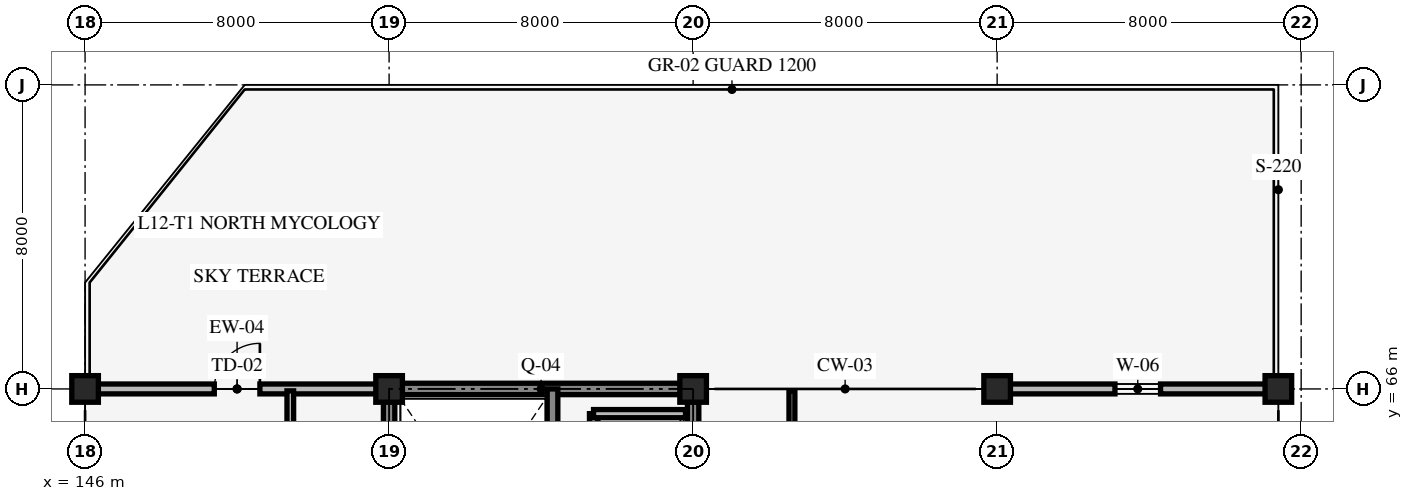
"""IFC4 building model, lengths in metres.
Left out: names, types, materials, properties, quantities, classifications, styles, units other than length and angle.
Written with IfcOpenShell. Run it as: python <this file> out.ifc"""

import sys

from ifc_helpers import new_model, si_unit, direction, frame, frame_2d, origin, origin_2d, place, context, subcontext, project, spatial, rectangle, extrude, element, fill, save


model = new_model("IFC4")
c1 = context("Model", 3, precision=1e-05, world=origin(), true_north=direction((0.0, 1.0)))
c2 = subcontext(c1, "Body", "Model", "MODEL_VIEW")
j1 = project(units=[si_unit("LENGTHUNIT", "METRE"), si_unit("PLANEANGLEUNIT", "RADIAN")], contexts=[c1])
p1 = place(None, origin())
s1 = spatial("IfcSite", under=j1, at=p1, CompositionType="ELEMENT")
p2 = place(p1, origin())
s2 = spatial("IfcBuilding", under=s1, at=p2, CompositionType="ELEMENT")
p3 = place(p2, frame((0.0, 0.0, 48.6)))
s3 = spatial("IfcBuildingStorey", under=s2, at=p3, CompositionType="ELEMENT", Elevation=48.6)
p4 = place(p3, frame((162.0, 58.0, 0.0), z_axis=(0.0, 0.0, 1.0), x_axis=(0.0, 1.0, 0.0)))
e1 = element("IfcWall", 1, at=p4, inside=s3, PredefinedType="SHEAR", context=c2, shape_type="SweptSolid", body=[
    extrude(rectangle(XDim=8.0, YDim=0.3, at=frame_2d((4.0, 0.0))), origin(), (0.0, 0.0, 1.0), 3.95),
])
p5 = place(p4, frame((3.275, 0.0, 0.0)))
e2 = element("IfcOpeningElement", 2, at=p5, cuts=e1, PredefinedType="OPENING", context=c2, shape_type="SweptSolid", body=[
    extrude(rectangle(XDim=1.05, YDim=2.2, at=frame_2d((0.525, 1.1))), frame((0.0, 0.16, 0.0), z_axis=(0.0, -1.0, 0.0), x_axis=(1.0, 0.0, 0.0)), (0.0, 0.0, 1.0), 0.32),
])
p6 = place(p4, frame((5.45, 0.0, 0.0)))
e3 = element("IfcOpeningElement", 3, at=p6, cuts=e1, PredefinedType="OPENING", context=c2, shape_type="SweptSolid", body=[
    extrude(rectangle(XDim=1.4, YDim=2.3, at=frame_2d((0.7, 1.15))), frame((0.0, 0.16, 0.0), z_axis=(0.0, -1.0, 0.0), x_axis=(1.0, 0.0, 0.0)), (0.0, 0.0, 1.0), 0.32),
])
for number, where, z_axis, x_axis in (
    (4, (162.0, 66.0, 0.0), (0.0, 0.0, 1.0), (-1.0, 0.0, 0.0)),
    (5, (154.0, 66.0, 0.0), (0.0, 0.0, 1.0), (0.0, -1.0, 0.0)),
):
    element("IfcWall", number, at=place(p3, frame(where, z_axis=z_axis, x_axis=x_axis)), inside=s3, PredefinedType="SHEAR", context=c2, shape_type="SweptSolid", body=[
        extrude(rectangle(XDim=8.0, YDim=0.3, at=frame_2d((4.0, 0.0))), origin(), (0.0, 0.0, 1.0), 3.95),
    ])
p7 = place(p3, frame((158.3, 58.0, 0.0), z_axis=(0.0, 0.0, 1.0), x_axis=(0.0, 1.0, 0.0)))
e6 = element("IfcWall", 6, at=p7, inside=s3, PredefinedType="SHEAR", context=c2, shape_type="SweptSolid", body=[
    extrude(rectangle(XDim=8.0, YDim=0.28, at=frame_2d((4.0, 0.0))), origin(), (0.0, 0.0, 1.0), 3.95),
])
for number, where, z_axis, x_axis in (
    (7, (146.0, 66.0, 0.0), (0.0, 0.0, 1.0), (1.0, 0.0, 0.0)),
    (8, (154.0, 66.0, 0.0), (0.0, 0.0, 1.0), (1.0, 0.0, 0.0)),
    (9, (162.0, 66.0, 0.0), (0.0, 0.0, 1.0), (1.0, 0.0, 0.0)),
    (10, (170.0, 66.0, 0.0), (0.0, 0.0, 1.0), (1.0, 0.0, 0.0)),
    (11, (177.4, 66.0, 0.0), (0.0, 0.0, 1.0), (1.0, 0.0, 0.0)),
):
    element("IfcColumn", number, at=place(p3, frame(where, z_axis=z_axis, x_axis=x_axis)), inside=s3, PredefinedType="COLUMN", context=c2, shape_type="SweptSolid", body=[
        extrude(rectangle(XDim=0.7, YDim=0.7, at=origin_2d()), origin(), (0.0, 0.0, 1.0), 4.2),
    ])
p8 = place(p3, frame((146.0, 66.0, 0.0), z_axis=(0.0, 0.0, 1.0), x_axis=(1.0, 0.0, 0.0)))
e12 = element("IfcWall", 12, at=p8, inside=s3, PredefinedType="STANDARD", context=c2, shape_type="SweptSolid", body=[
    extrude(rectangle(XDim=8.0, YDim=0.26, at=frame_2d((4.0, 0.0))), origin(), (0.0, 0.0, 1.0), 3.34),
])
p9 = place(p8, frame((3.4, 0.0, 0.0)))
e13 = element("IfcOpeningElement", 13, at=p9, cuts=e12, PredefinedType="OPENING", context=c2, shape_type="SweptSolid", body=[
    extrude(rectangle(XDim=1.2, YDim=2.2, at=frame_2d((0.6, 1.1))), frame((0.0, 0.14, 0.0), z_axis=(0.0, -1.0, 0.0), x_axis=(1.0, 0.0, 0.0)), (0.0, 0.0, 1.0), 0.28),
])
p10 = place(p3, frame((170.0, 66.0, 0.0), z_axis=(0.0, 0.0, 1.0), x_axis=(1.0, 0.0, 0.0)))
e14 = element("IfcWall", 14, at=p10, inside=s3, PredefinedType="STANDARD", context=c2, shape_type="SweptSolid", body=[
    extrude(rectangle(XDim=7.4, YDim=0.26, at=frame_2d((3.7, 0.0))), origin(), (0.0, 0.0, 1.0), 3.19),
])
p11 = place(p10, frame((3.1, 0.0, 0.85)))
e15 = element("IfcOpeningElement", 15, at=p11, cuts=e14, PredefinedType="OPENING", context=c2, shape_type="SweptSolid", body=[
    extrude(rectangle(XDim=1.2, YDim=1.2, at=frame_2d((0.6, 0.6))), frame((0.0, 0.14, 0.0), z_axis=(0.0, -1.0, 0.0), x_axis=(1.0, 0.0, 0.0)), (0.0, 0.0, 1.0), 0.28),
])
p12 = place(p3, frame((159.38, 62.9, 0.0), z_axis=(0.0, 0.0, 1.0), x_axis=(0.0, 1.0, 0.0)))
e16 = element("IfcWall", 16, at=p12, inside=s3, PredefinedType="STANDARD", context=c2, shape_type="SweptSolid", body=[
    extrude(rectangle(XDim=2.45, YDim=0.215, at=frame_2d((1.225, 0.0))), origin(), (0.0, 0.0, 1.0), 3.9),
])
p13 = place(p3, frame((159.38, 65.35, 0.0), z_axis=(0.0, 0.0, 1.0), x_axis=(1.0, 0.0, 0.0)))
e17 = element("IfcWall", 17, at=p13, inside=s3, PredefinedType="STANDARD", context=c2, shape_type="SweptSolid", body=[
    extrude(rectangle(XDim=2.42, YDim=0.215, at=frame_2d((1.21, 0.0))), origin(), (0.0, 0.0, 1.0), 3.9),
])
p14 = place(p3, frame((151.4, 58.12, 0.0), z_axis=(0.0, 0.0, 1.0), x_axis=(0.0, 1.0, 0.0)))
e18 = element("IfcWall", 18, at=p14, inside=s3, PredefinedType="STANDARD", context=c2, shape_type="SweptSolid", body=[
    extrude(rectangle(XDim=7.83, YDim=0.175, at=frame_2d((3.915, 0.0))), origin(), (0.0, 0.0, 1.0), 3.9),
])
p15 = place(p14, frame((3.115, 0.0, 0.0)))
e19 = element("IfcOpeningElement", 19, at=p15, cuts=e18, PredefinedType="OPENING", context=c2, shape_type="SweptSolid", body=[
    extrude(rectangle(XDim=1.6, YDim=2.25, at=frame_2d((0.8, 1.125))), frame((0.0, 0.098, 0.0), z_axis=(0.0, -1.0, 0.0), x_axis=(1.0, 0.0, 0.0)), (0.0, 0.0, 1.0), 0.195),
])
p16 = place(p3, frame((164.6, 58.08, 0.0), z_axis=(0.0, 0.0, 1.0), x_axis=(0.0, 1.0, 0.0)))
e20 = element("IfcWall", 20, at=p16, inside=s3, PredefinedType="STANDARD", context=c2, shape_type="SweptSolid", body=[
    extrude(rectangle(XDim=7.87, YDim=0.155, at=frame_2d((3.935, 0.0))), origin(), (0.0, 0.0, 1.0), 3.9),
])
p17 = place(p16, frame((3.285, 0.0, 0.0)))
e21 = element("IfcOpeningElement", 21, at=p17, cuts=e20, PredefinedType="OPENING", context=c2, shape_type="SweptSolid", body=[
    extrude(rectangle(XDim=1.3, YDim=2.15, at=frame_2d((0.65, 1.075))), frame((0.0, 0.087, 0.0), z_axis=(0.0, -1.0, 0.0), x_axis=(1.0, 0.0, 0.0)), (0.0, 0.0, 1.0), 0.175),
])
p18 = place(p9, origin())
e22 = element("IfcDoor", 22, at=p18, inside=s3, OperationType="SINGLE_SWING_RIGHT", PredefinedType="DOOR", context=c2, shape_type="SweptSolid", body=[
    extrude(rectangle(XDim=1.2, YDim=2.2, at=frame_2d((0.6, 1.1))), frame((0.0, 0.025, 0.0), z_axis=(0.0, -1.0, 0.0), x_axis=(1.0, 0.0, 0.0)), (0.0, 0.0, 1.0), 0.05),
])
fill(e13, e22)
p19 = place(p11, origin())
e23 = element("IfcWindow", 23, at=p19, inside=s3, PartitioningType="SINGLE_PANEL", PredefinedType="WINDOW", context=c2, shape_type="SweptSolid", body=[
    extrude(rectangle(XDim=1.2, YDim=1.2, at=frame_2d((0.6, 0.6))), frame((0.0, 0.03, 0.0), z_axis=(0.0, -1.0, 0.0), x_axis=(1.0, 0.0, 0.0)), (0.0, 0.0, 1.0), 0.06),
])
fill(e15, e23)
save(model, sys.argv[1])
